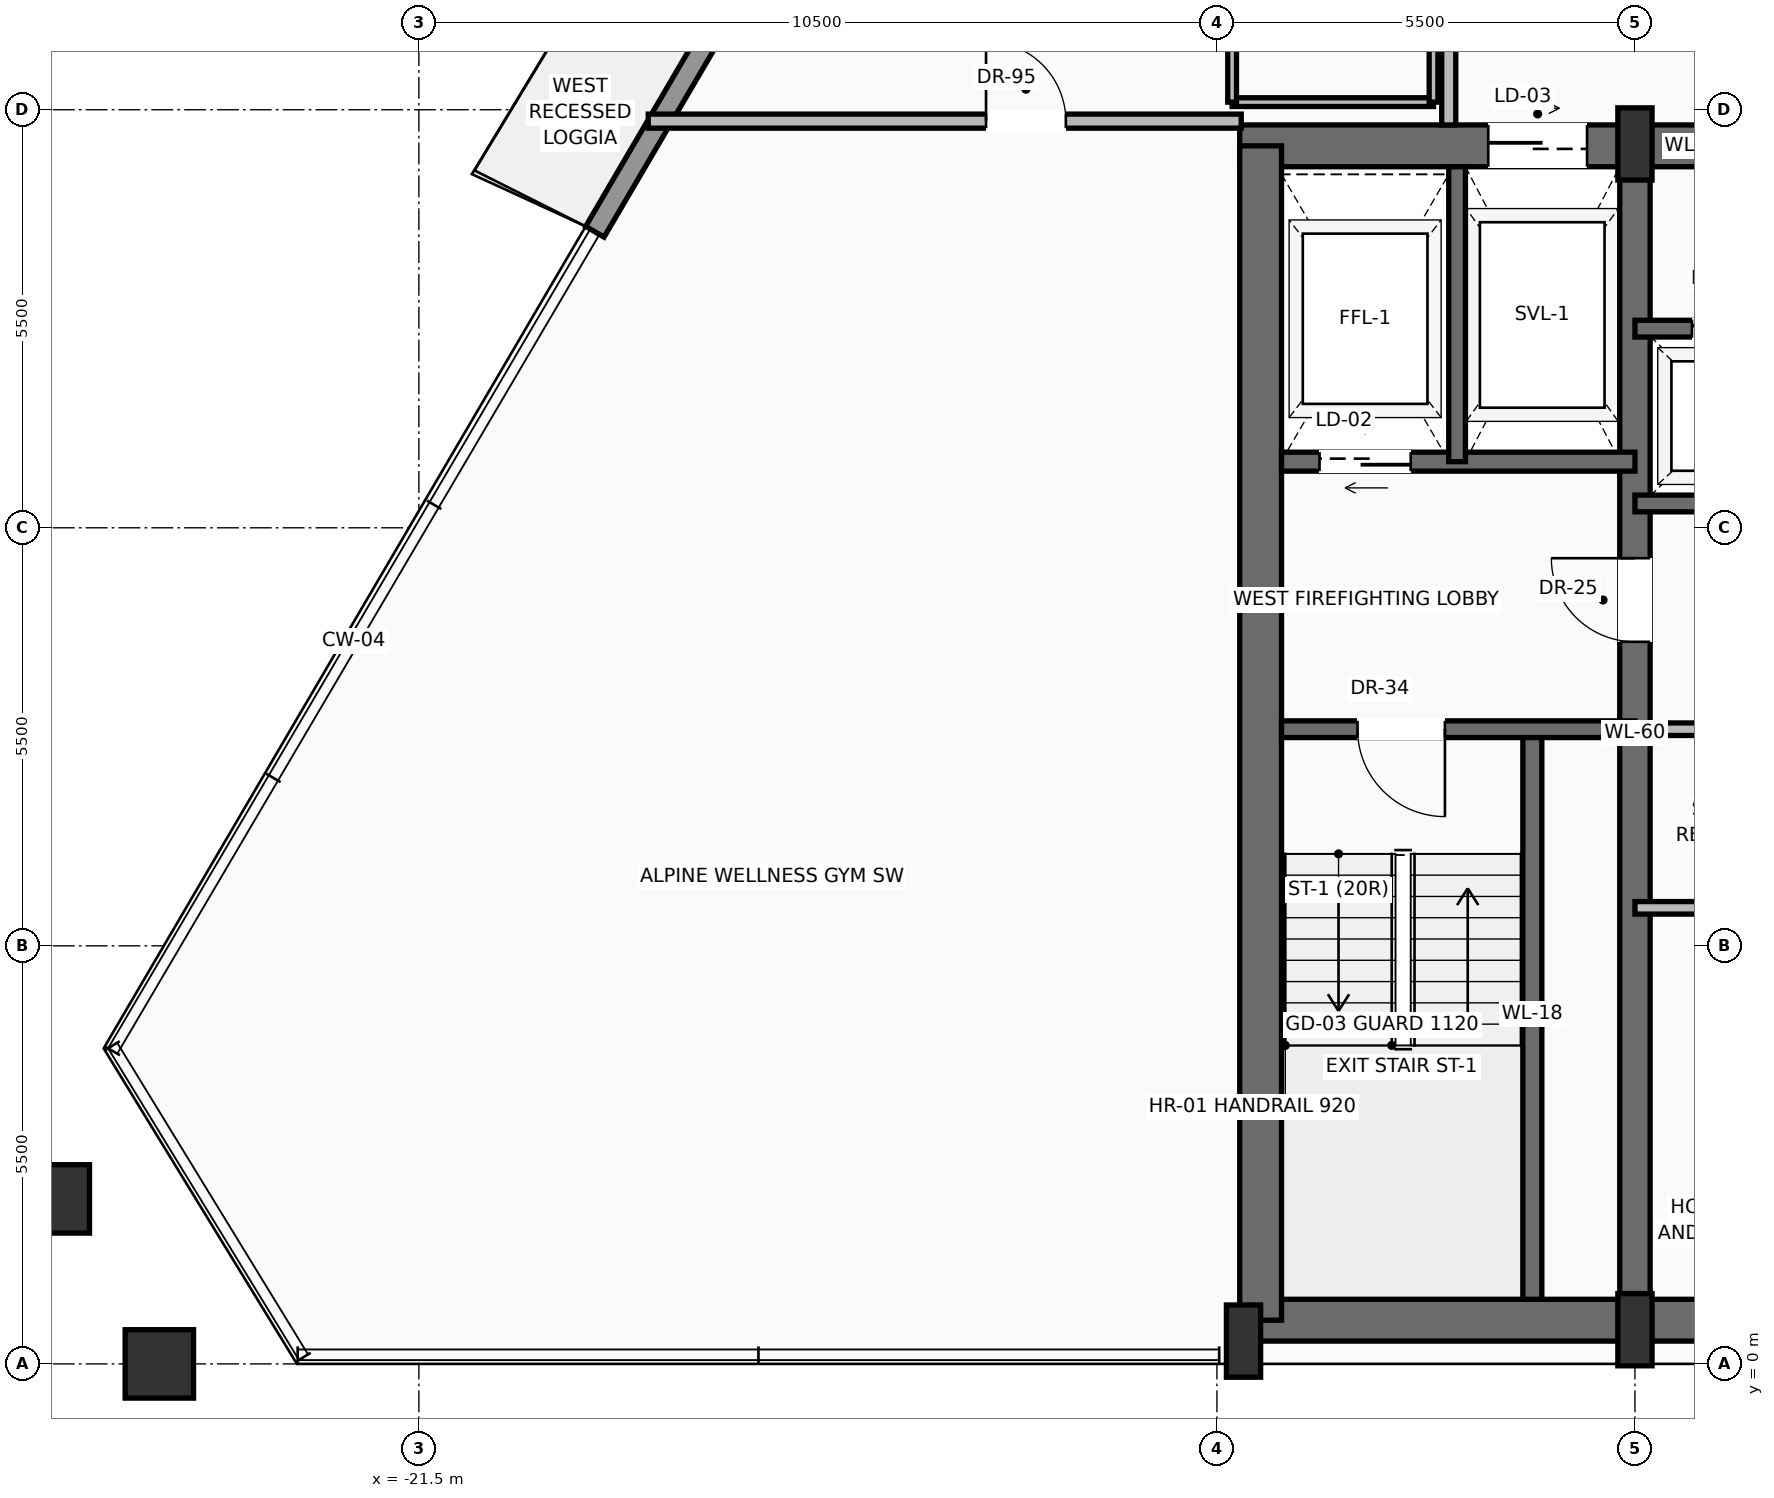
"""IFC4 building model, lengths in metres.
Left out: names, types, materials, properties, quantities, classifications, styles, units other than length and angle.
Written with IfcOpenShell. Run it as: python <this file> out.ifc"""

import sys

from ifc_helpers import new_model, si_unit, direction, frame, frame_2d, origin, origin_2d, place, context, subcontext, project, spatial, rectangle, hollow_rectangle, extrude, source, transform, mapped, element, fill, save


model = new_model("IFC4")
c1 = context("Model", 3, precision=1e-05, world=origin(), true_north=direction((0.0, 1.0)))
c2 = subcontext(c1, "Body", "Model", "MODEL_VIEW")
j1 = project(units=[si_unit("LENGTHUNIT", "METRE"), si_unit("PLANEANGLEUNIT", "RADIAN")], contexts=[c1])
p1 = place(None, origin())
s1 = spatial("IfcSite", under=j1, at=p1, CompositionType="ELEMENT")
p2 = place(p1, origin())
s2 = spatial("IfcBuilding", under=s1, at=p2, CompositionType="ELEMENT")
p3 = place(p2, frame((0.0, 0.0, 247.6)))
s3 = spatial("IfcBuildingStorey", under=s2, at=p3, CompositionType="ELEMENT", Elevation=247.6)
p4 = place(p3, frame((-10.65, 0.575, 0.0), z_axis=(0.0, 0.0, 1.0), x_axis=(1.0, 0.0, 0.0)))
e1 = element("IfcWall", 1, at=p4, inside=s3, PredefinedType="SHEAR", context=c2, shape_type="SweptSolid", body=[
    extrude(rectangle(XDim=21.3, YDim=0.55, at=frame_2d((10.65, 0.0))), origin(), (0.0, 0.0, 1.0), 3.24),
])
p5 = place(p3, frame((-10.7, 16.025, 0.0), z_axis=(0.0, 0.0, 1.0), x_axis=(1.0, 0.0, 0.0)))
e2 = element("IfcWall", 2, at=p5, inside=s3, PredefinedType="SHEAR", context=c2, shape_type="SweptSolid", body=[
    extrude(rectangle(XDim=21.4, YDim=0.55, at=frame_2d((10.7, 0.0))), origin(), (0.0, 0.0, 1.0), 3.24),
])
p6 = place(p5, frame((3.27, 0.0, 0.0)))
e3 = element("IfcOpeningElement", 3, at=p6, cuts=e2, PredefinedType="OPENING", context=c2, shape_type="SweptSolid", body=[
    extrude(rectangle(XDim=1.3, YDim=2.3, at=frame_2d((0.65, 1.15))), frame((0.0, 0.285, 0.0), z_axis=(0.0, -1.0, 0.0), x_axis=(1.0, 0.0, 0.0)), (0.0, 0.0, 1.0), 0.57),
])
p7 = place(p5, frame((9.7, 0.0, 0.0)))
e4 = element("IfcOpeningElement", 4, at=p7, cuts=e2, PredefinedType="OPENING", context=c2, shape_type="SweptSolid", body=[
    extrude(rectangle(XDim=2.0, YDim=2.4, at=frame_2d((1.0, 1.2))), frame((0.0, 0.285, 0.0), z_axis=(0.0, -1.0, 0.0), x_axis=(1.0, 0.0, 0.0)), (0.0, 0.0, 1.0), 0.57),
])
p8 = place(p3, frame((-10.425, 0.575, 0.0), z_axis=(0.0, 0.0, 1.0), x_axis=(0.0, 1.0, 0.0)))
e5 = element("IfcWall", 5, at=p8, inside=s3, PredefinedType="SHEAR", context=c2, shape_type="SweptSolid", body=[
    extrude(rectangle(XDim=15.45, YDim=0.55, at=frame_2d((7.725, 0.0))), origin(), (0.0, 0.0, 1.0), 3.24),
])
p9 = place(p3, frame((-5.5, 0.575, 0.0), z_axis=(0.0, 0.0, 1.0), x_axis=(0.0, 1.0, 0.0)))
e6 = element("IfcWall", 6, at=p9, inside=s3, PredefinedType="SHEAR", context=c2, shape_type="SweptSolid", body=[
    extrude(rectangle(XDim=15.45, YDim=0.4, at=frame_2d((7.725, 0.0))), origin(), (0.0, 0.0, 1.0), 3.24),
])
p10 = place(p9, frame((8.925, 0.0, 0.0)))
e7 = element("IfcOpeningElement", 7, at=p10, cuts=e6, PredefinedType="OPENING", context=c2, shape_type="SweptSolid", body=[
    extrude(rectangle(XDim=1.1, YDim=2.2, at=frame_2d((0.55, 1.1))), frame((0.0, 0.21, 0.0), z_axis=(0.0, -1.0, 0.0), x_axis=(1.0, 0.0, 0.0)), (0.0, 0.0, 1.0), 0.42),
])
m1 = source(origin(), c2, "Body", "SweptSolid", [
    extrude(rectangle(XDim=0.45, YDim=0.95, at=origin_2d()), origin(), (0.0, 0.0, 1.0), 3.45),
])
for number, where, z_axis, x_axis in (
    (8, (-10.65, 0.3, 0.0), (0.0, 0.0, 1.0), (1.0, 0.0, 0.0)),
    (9, (-5.5, 0.45, 0.0), (0.0, 0.0, 1.0), (1.0, 0.0, 0.0)),
    (10, (-5.5, 16.05, 0.0), (0.0, 0.0, 1.0), (1.0, 0.0, 0.0)),
):
    element("IfcColumn", number, at=place(p3, frame(where, z_axis=z_axis, x_axis=x_axis)), inside=s3, PredefinedType="PILASTER", context=c2, shape_type="MappedRepresentation", body=[
        mapped(m1, transform((0.0, 0.0, 0.0), scale=1.0)),
    ])
m2 = source(origin(), c2, "Body", "SweptSolid", [
    extrude(hollow_rectangle(XDim=0.9, YDim=0.9, WallThickness=0.045, at=origin_2d()), origin(), (0.0, 0.0, 1.0), 3.441),
])
p11 = place(p3, frame((-24.915, 0.0, 0.004), z_axis=(-0.002057462832, 0.0, 0.999997883421), x_axis=(0.0, -1.0, 0.0)))
e11 = element("IfcColumn", 11, at=p11, inside=s3, PredefinedType="COLUMN", context=c2, shape_type="MappedRepresentation", body=[
    mapped(m2, transform((0.0, 0.0, 0.0), scale=1.0)),
])
m3 = source(origin(), c2, "Body", "SweptSolid", [
    extrude(hollow_rectangle(XDim=0.9, YDim=0.9, WallThickness=0.045, at=origin_2d()), origin(), (0.0, 0.0, 1.0), 3.442),
])
p12 = place(p3, frame((-26.283, 2.171, 0.004), z_axis=(0.009930658923, -0.017094920004, 0.999804553762), x_axis=(0.864688411716, 0.502308620914, 0.0)))
e12 = element("IfcColumn", 12, at=p12, inside=s3, PredefinedType="COLUMN", context=c2, shape_type="MappedRepresentation", body=[
    mapped(m3, transform((0.0, 0.0, 0.0), scale=1.0)),
])
p13 = place(p3, frame((-19.184, 14.895, 0.0), z_axis=(0.0, 0.0, 1.0), x_axis=(0.505884551296, 0.862601194504, 0.0)))
e13 = element("IfcWall", 13, at=p13, inside=s3, PredefinedType="SOLIDWALL", context=c2, shape_type="SweptSolid", body=[
    extrude(rectangle(XDim=19.701, YDim=0.28, at=frame_2d((9.85, 0.0))), origin(), (0.0, 0.0, 1.0), 2.82),
])
p14 = place(p13, frame((4.728, 0.0, 0.0)))
e14 = element("IfcOpeningElement", 14, at=p14, cuts=e13, PredefinedType="OPENING", context=c2, shape_type="SweptSolid", body=[
    extrude(rectangle(XDim=1.6, YDim=2.35, at=frame_2d((0.8, 1.175))), frame((0.0, 0.15, 0.0), z_axis=(0.0, -1.0, 0.0), x_axis=(1.0, 0.0, 0.0)), (0.0, 0.0, 1.0), 0.3),
])
p15 = place(p13, frame((13.396, 0.0, 0.9)))
e15 = element("IfcOpeningElement", 15, at=p15, cuts=e13, PredefinedType="OPENING", context=c2, shape_type="SweptSolid", body=[
    extrude(rectangle(XDim=2.0, YDim=1.75, at=frame_2d((1.0, 0.875))), frame((0.0, 0.15, 0.0), z_axis=(0.0, -1.0, 0.0), x_axis=(1.0, 0.0, 0.0)), (0.0, 0.0, 1.0), 0.3),
])
p16 = place(p3, frame((-6.85, 0.85, 0.0), z_axis=(0.0, 0.0, 1.0), x_axis=(0.0, 1.0, 0.0)))
e16 = element("IfcWall", 16, at=p16, inside=s3, PredefinedType="SOLIDWALL", context=c2, shape_type="SweptSolid", body=[
    extrude(rectangle(XDim=7.5, YDim=0.25, at=frame_2d((3.75, 0.0))), origin(), (0.0, 0.0, 1.0), 3.24),
])
p17 = place(p3, frame((-5.5, 8.35, 0.0), z_axis=(0.0, 0.0, 1.0), x_axis=(-1.0, 0.0, 0.0)))
e17 = element("IfcWall", 17, at=p17, inside=s3, PredefinedType="SOLIDWALL", context=c2, shape_type="SweptSolid", body=[
    extrude(rectangle(XDim=4.65, YDim=0.22, at=frame_2d((2.325, 0.0))), origin(), (0.0, 0.0, 1.0), 3.24),
])
p18 = place(p17, frame((2.5, 0.0, 0.0)))
e18 = element("IfcOpeningElement", 18, at=p18, cuts=e17, PredefinedType="OPENING", context=c2, shape_type="SweptSolid", body=[
    extrude(rectangle(XDim=1.15, YDim=2.2, at=frame_2d((0.575, 1.1))), frame((0.0, 0.12, 0.0), z_axis=(0.0, -1.0, 0.0), x_axis=(1.0, 0.0, 0.0)), (0.0, 0.0, 1.0), 0.24),
])
p19 = place(p3, frame((-5.5, 11.87, 0.0), z_axis=(0.0, 0.0, 1.0), x_axis=(-1.0, 0.0, 0.0)))
e19 = element("IfcWall", 19, at=p19, inside=s3, PredefinedType="SOLIDWALL", context=c2, shape_type="SweptSolid", body=[
    extrude(rectangle(XDim=4.65, YDim=0.25, at=frame_2d((2.325, 0.0))), origin(), (0.0, 0.0, 1.0), 3.24),
])
p20 = place(p19, frame((2.95, 0.0, 0.0)))
e20 = element("IfcOpeningElement", 20, at=p20, cuts=e19, PredefinedType="OPENING", context=c2, shape_type="SweptSolid", body=[
    extrude(rectangle(XDim=1.2, YDim=2.25, at=frame_2d((0.6, 1.125))), frame((0.0, 0.135, 0.0), z_axis=(0.0, -1.0, 0.0), x_axis=(1.0, 0.0, 0.0)), (0.0, 0.0, 1.0), 0.27),
])
p21 = place(p3, frame((-7.84, 11.87, 0.0), z_axis=(0.0, 0.0, 1.0), x_axis=(0.0, 1.0, 0.0)))
e21 = element("IfcWall", 21, at=p21, inside=s3, PredefinedType="SOLIDWALL", context=c2, shape_type="SweptSolid", body=[
    extrude(rectangle(XDim=3.88, YDim=0.22, at=frame_2d((1.94, 0.0))), origin(), (0.0, 0.0, 1.0), 3.24),
])
p22 = place(p3, frame((-5.5, 6.0, 0.0), z_axis=(0.0, 0.0, 1.0), x_axis=(1.0, 0.0, 0.0)))
e22 = element("IfcWall", 22, at=p22, inside=s3, PredefinedType="PARTITIONING", context=c2, shape_type="SweptSolid", body=[
    extrude(rectangle(XDim=10.8, YDim=0.165, at=frame_2d((5.4, 0.0))), origin(), (0.0, 0.0, 1.0), 3.232),
])
p23 = place(p22, frame((7.7, 0.0, 0.0)))
e23 = element("IfcOpeningElement", 23, at=p23, cuts=e22, PredefinedType="OPENING", context=c2, shape_type="SweptSolid", body=[
    extrude(rectangle(XDim=0.9, YDim=2.1, at=frame_2d((0.45, 1.05))), frame((0.0, 0.093, 0.0), z_axis=(0.0, -1.0, 0.0), x_axis=(1.0, 0.0, 0.0)), (0.0, 0.0, 1.0), 0.185),
])
p24 = place(p3, frame((-5.3, 8.35, 0.0), z_axis=(0.0, 0.0, 1.0), x_axis=(1.0, 0.0, 0.0)))
e24 = element("IfcWall", 24, at=p24, inside=s3, PredefinedType="PARTITIONING", context=c2, shape_type="SweptSolid", body=[
    extrude(rectangle(XDim=7.12, YDim=0.165, at=frame_2d((3.56, 0.0))), origin(), (0.0, 0.0, 1.0), 3.232),
])
p25 = place(p24, frame((0.85, 0.0, 0.0)))
e25 = element("IfcOpeningElement", 25, at=p25, cuts=e24, PredefinedType="OPENING", context=c2, shape_type="SweptSolid", body=[
    extrude(rectangle(XDim=0.9, YDim=2.1, at=frame_2d((0.45, 1.05))), frame((0.0, 0.093, 0.0), z_axis=(0.0, -1.0, 0.0), x_axis=(1.0, 0.0, 0.0)), (0.0, 0.0, 1.0), 0.185),
])
p26 = place(p24, frame((3.25, 0.0, 0.0)))
e26 = element("IfcOpeningElement", 26, at=p26, cuts=e24, PredefinedType="OPENING", context=c2, shape_type="SweptSolid", body=[
    extrude(rectangle(XDim=0.9, YDim=2.1, at=frame_2d((0.45, 1.05))), frame((0.0, 0.093, 0.0), z_axis=(0.0, -1.0, 0.0), x_axis=(1.0, 0.0, 0.0)), (0.0, 0.0, 1.0), 0.185),
])
p27 = place(p3, frame((-5.5, 11.32, 0.0), z_axis=(0.0, 0.0, 1.0), x_axis=(1.0, 0.0, 0.0)))
e27 = element("IfcWall", 27, at=p27, inside=s3, PredefinedType="SOLIDWALL", context=c2, shape_type="SweptSolid", body=[
    extrude(rectangle(XDim=7.32, YDim=0.22, at=frame_2d((3.66, 0.0))), origin(), (0.0, 0.0, 1.0), 3.24),
])
p28 = place(p3, frame((-5.5, 13.62, 0.0), z_axis=(0.0, 0.0, 1.0), x_axis=(1.0, 0.0, 0.0)))
e28 = element("IfcWall", 28, at=p28, inside=s3, PredefinedType="SOLIDWALL", context=c2, shape_type="SweptSolid", body=[
    extrude(rectangle(XDim=7.32, YDim=0.22, at=frame_2d((3.66, 0.0))), origin(), (0.0, 0.0, 1.0), 3.24),
])
p29 = place(p28, frame((0.75, 0.0, 0.0)))
e29 = element("IfcOpeningElement", 29, at=p29, cuts=e28, PredefinedType="OPENING", context=c2, shape_type="SweptSolid", body=[
    extrude(rectangle(XDim=1.1, YDim=2.2, at=frame_2d((0.55, 1.1))), frame((0.0, 0.12, 0.0), z_axis=(0.0, -1.0, 0.0), x_axis=(1.0, 0.0, 0.0)), (0.0, 0.0, 1.0), 0.24),
])
p30 = place(p28, frame((3.15, 0.0, 0.0)))
e30 = element("IfcOpeningElement", 30, at=p30, cuts=e28, PredefinedType="OPENING", context=c2, shape_type="SweptSolid", body=[
    extrude(rectangle(XDim=1.1, YDim=2.2, at=frame_2d((0.55, 1.1))), frame((0.0, 0.12, 0.0), z_axis=(0.0, -1.0, 0.0), x_axis=(1.0, 0.0, 0.0)), (0.0, 0.0, 1.0), 0.24),
])
p31 = place(p28, frame((5.55, 0.0, 0.0)))
e31 = element("IfcOpeningElement", 31, at=p31, cuts=e28, PredefinedType="OPENING", context=c2, shape_type="SweptSolid", body=[
    extrude(rectangle(XDim=1.1, YDim=2.2, at=frame_2d((0.55, 1.1))), frame((0.0, 0.12, 0.0), z_axis=(0.0, -1.0, 0.0), x_axis=(1.0, 0.0, 0.0)), (0.0, 0.0, 1.0), 0.24),
])
p32 = place(p3, frame((-7.95, 16.3, 0.0), z_axis=(0.0, 0.0, 1.0), x_axis=(0.0, 1.0, 0.0)))
e32 = element("IfcWall", 32, at=p32, inside=s3, PredefinedType="PARTITIONING", context=c2, shape_type="SweptSolid", body=[
    extrude(rectangle(XDim=13.9, YDim=0.185, at=frame_2d((6.95, 0.0))), origin(), (0.0, 0.0, 1.0), 3.232),
])
p33 = place(p32, frame((3.144, 0.0, 0.0)))
e33 = element("IfcOpeningElement", 33, at=p33, cuts=e32, PredefinedType="OPENING", context=c2, shape_type="SweptSolid", body=[
    extrude(rectangle(XDim=1.05, YDim=2.25, at=frame_2d((0.525, 1.125))), frame((0.0, 0.103, 0.0), z_axis=(0.0, -1.0, 0.0), x_axis=(1.0, 0.0, 0.0)), (0.0, 0.0, 1.0), 0.205),
])
p34 = place(p32, frame((9.849, 0.0, 0.0)))
e34 = element("IfcOpeningElement", 34, at=p34, cuts=e32, PredefinedType="OPENING", context=c2, shape_type="SweptSolid", body=[
    extrude(rectangle(XDim=1.05, YDim=2.25, at=frame_2d((0.525, 1.125))), frame((0.0, 0.103, 0.0), z_axis=(0.0, -1.0, 0.0), x_axis=(1.0, 0.0, 0.0)), (0.0, 0.0, 1.0), 0.205),
])
p35 = place(p3, frame((-18.482, 16.35, 0.0), z_axis=(0.0, 0.0, 1.0), x_axis=(1.0, 0.0, 0.0)))
e35 = element("IfcWall", 35, at=p35, inside=s3, PredefinedType="PARTITIONING", context=c2, shape_type="SweptSolid", body=[
    extrude(rectangle(XDim=7.802, YDim=0.185, at=frame_2d((3.901, 0.0))), origin(), (0.0, 0.0, 1.0), 3.232),
])
p36 = place(p35, frame((4.444, 0.0, 0.0)))
e36 = element("IfcOpeningElement", 36, at=p36, cuts=e35, PredefinedType="OPENING", context=c2, shape_type="SweptSolid", body=[
    extrude(rectangle(XDim=1.05, YDim=2.25, at=frame_2d((0.525, 1.125))), frame((0.0, 0.103, 0.0), z_axis=(0.0, -1.0, 0.0), x_axis=(1.0, 0.0, 0.0)), (0.0, 0.0, 1.0), 0.205),
])
p37 = place(p3, frame((-10.8, 16.6, 0.0), z_axis=(0.0, 0.0, 1.0), x_axis=(1.0, 0.0, 0.0)))
e37 = element("IfcWall", 37, at=p37, inside=s3, PredefinedType="PARTITIONING", context=c2, shape_type="SweptSolid", body=[
    extrude(rectangle(XDim=2.65, YDim=0.115, at=frame_2d((1.325, 0.0))), origin(), (0.0, 0.0, 1.0), 3.232),
])
p38 = place(p3, frame((-10.8, 16.6, 0.0), z_axis=(0.0, 0.0, 1.0), x_axis=(0.0, 1.0, 0.0)))
e38 = element("IfcWall", 38, at=p38, inside=s3, PredefinedType="PARTITIONING", context=c2, shape_type="SweptSolid", body=[
    extrude(rectangle(XDim=2.4, YDim=0.115, at=frame_2d((1.2, 0.0))), origin(), (0.0, 0.0, 1.0), 3.232),
])
p39 = place(p38, frame((0.75, 0.0, 0.0)))
e39 = element("IfcOpeningElement", 39, at=p39, cuts=e38, PredefinedType="OPENING", context=c2, shape_type="SweptSolid", body=[
    extrude(rectangle(XDim=0.9, YDim=2.15, at=frame_2d((0.45, 1.075))), frame((0.0, 0.067, 0.0), z_axis=(0.0, -1.0, 0.0), x_axis=(1.0, 0.0, 0.0)), (0.0, 0.0, 1.0), 0.135),
])
p40 = place(p3, frame((-8.15, 16.6, 0.0), z_axis=(0.0, 0.0, 1.0), x_axis=(0.0, 1.0, 0.0)))
e40 = element("IfcWall", 40, at=p40, inside=s3, PredefinedType="PARTITIONING", context=c2, shape_type="SweptSolid", body=[
    extrude(rectangle(XDim=2.4, YDim=0.115, at=frame_2d((1.2, 0.0))), origin(), (0.0, 0.0, 1.0), 3.232),
])
m4 = source(origin(), c2, "Body", "SweptSolid", [
    extrude(rectangle(XDim=1.15, YDim=2.2, at=frame_2d((0.575, 1.1))), frame((0.0, 0.025, 0.0), z_axis=(0.0, -1.0, 0.0), x_axis=(1.0, 0.0, 0.0)), (0.0, 0.0, 1.0), 0.05),
])
p41 = place(p18, origin())
e41 = element("IfcDoor", 41, at=p41, inside=s3, OperationType="SINGLE_SWING_LEFT", PredefinedType="DOOR", context=c2, shape_type="MappedRepresentation", body=[
    mapped(m4, transform((0.0, 0.0, 0.0), scale=1.0)),
])
fill(e18, e41)
m5 = source(origin(), c2, "Body", "SweptSolid", [
    extrude(rectangle(XDim=1.1, YDim=2.2, at=frame_2d((0.55, 1.1))), frame((0.0, 0.025, 0.0), z_axis=(0.0, -1.0, 0.0), x_axis=(1.0, 0.0, 0.0)), (0.0, 0.0, 1.0), 0.05),
])
p42 = place(p10, origin())
e42 = element("IfcDoor", 42, at=p42, inside=s3, OperationType="SINGLE_SWING_RIGHT", PredefinedType="DOOR", context=c2, shape_type="MappedRepresentation", body=[
    mapped(m5, transform((0.0, 0.0, 0.0), scale=1.0)),
])
fill(e7, e42)
m6 = source(origin(), c2, "Body", "SweptSolid", [
    extrude(rectangle(XDim=1.2, YDim=2.25, at=frame_2d((0.6, 1.125))), frame((0.0, 0.025, 0.0), z_axis=(0.0, -1.0, 0.0), x_axis=(1.0, 0.0, 0.0)), (0.0, 0.0, 1.0), 0.05),
])
p43 = place(p20, origin())
e43 = element("IfcDoor", 43, at=p43, inside=s3, OperationType="SLIDING_TO_LEFT", PredefinedType="DOOR", context=c2, shape_type="MappedRepresentation", body=[
    mapped(m6, transform((0.0, 0.0, 0.0), scale=1.0)),
])
fill(e20, e43)
m7 = source(origin(), c2, "Body", "SweptSolid", [
    extrude(rectangle(XDim=1.3, YDim=2.3, at=frame_2d((0.65, 1.15))), frame((0.0, 0.025, 0.0), z_axis=(0.0, -1.0, 0.0), x_axis=(1.0, 0.0, 0.0)), (0.0, 0.0, 1.0), 0.05),
])
p44 = place(p6, origin())
e44 = element("IfcDoor", 44, at=p44, inside=s3, OperationType="SLIDING_TO_RIGHT", PredefinedType="DOOR", context=c2, shape_type="MappedRepresentation", body=[
    mapped(m7, transform((0.0, 0.0, 0.0), scale=1.0)),
])
fill(e3, e44)
m8 = source(origin(), c2, "Body", "SweptSolid", [
    extrude(rectangle(XDim=1.1, YDim=2.2, at=frame_2d((0.55, 1.1))), frame((0.0, 0.025, 0.0), z_axis=(0.0, -1.0, 0.0), x_axis=(1.0, 0.0, 0.0)), (0.0, 0.0, 1.0), 0.05),
])
p45 = place(p29, origin())
e45 = element("IfcDoor", 45, at=p45, inside=s3, OperationType="SLIDING_TO_RIGHT", PredefinedType="DOOR", context=c2, shape_type="MappedRepresentation", body=[
    mapped(m8, transform((0.0, 0.0, 0.0), scale=1.0)),
])
fill(e29, e45)
m9 = source(origin(), c2, "Body", "SweptSolid", [
    extrude(rectangle(XDim=1.05, YDim=2.25, at=frame_2d((0.525, 1.125))), frame((0.0, 0.025, 0.0), z_axis=(0.0, -1.0, 0.0), x_axis=(1.0, 0.0, 0.0)), (0.0, 0.0, 1.0), 0.05),
])
p46 = place(p36, origin())
e46 = element("IfcDoor", 46, at=p46, inside=s3, OperationType="SINGLE_SWING_LEFT", PredefinedType="DOOR", context=c2, shape_type="MappedRepresentation", body=[
    mapped(m9, transform((0.0, 0.0, 0.0), scale=1.0)),
])
fill(e36, e46)
save(model, sys.argv[1])
